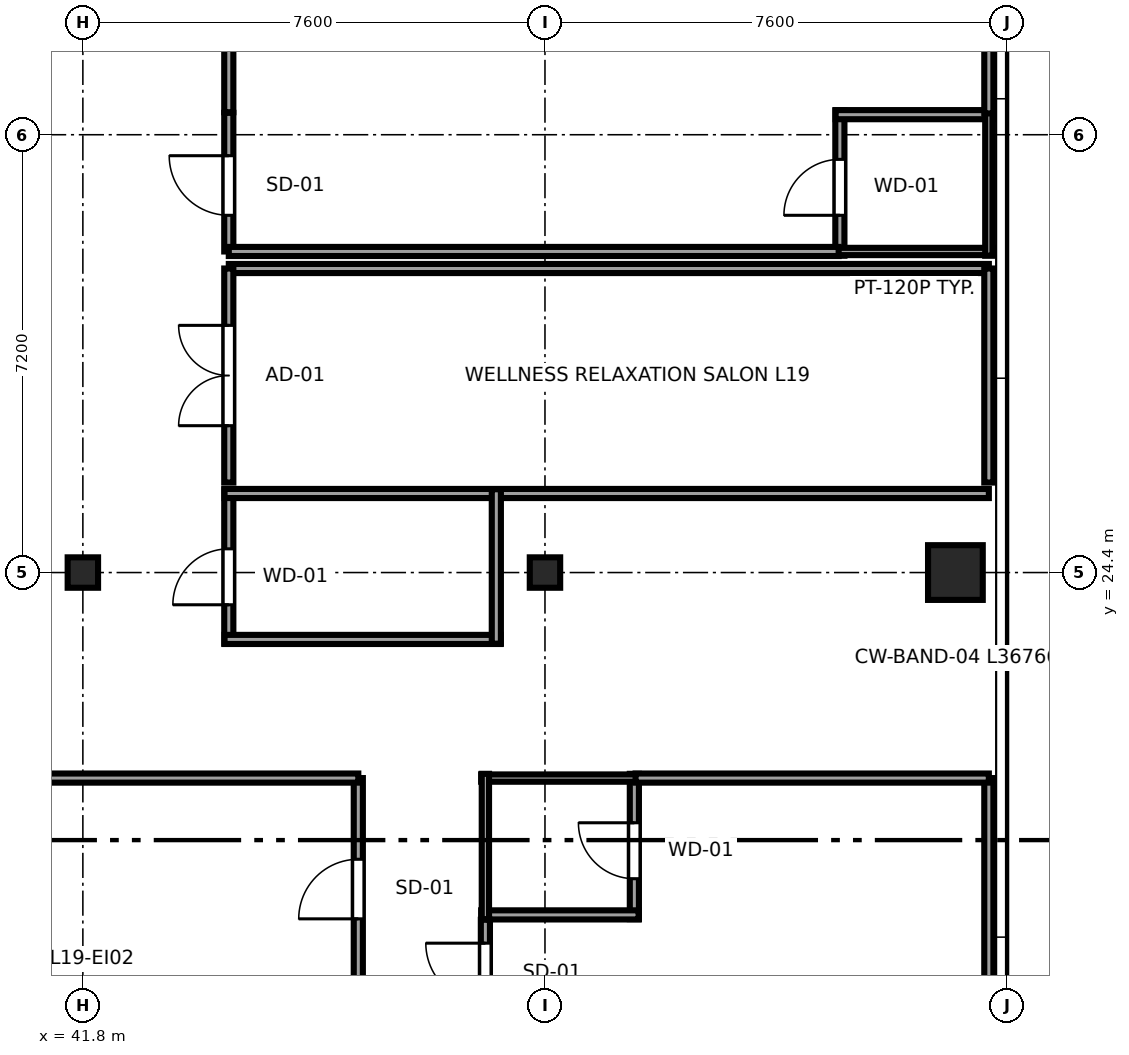
"""IFC4 building model, lengths in metres.
Left out: names, types, materials, properties, quantities, classifications, styles, units other than length and angle.
Written with IfcOpenShell. Run it as: python <this file> out.ifc"""

import sys

from ifc_helpers import new_model, si_unit, direction, frame, frame_2d, origin, origin_2d, place, context, subcontext, project, spatial, rectangle, i_section, extrude, source, transform, mapped, element, fill, save


model = new_model("IFC4")
c1 = context("Model", 3, precision=1e-05, world=origin(), true_north=direction((0.0, 1.0)))
c2 = subcontext(c1, "Body", "Model", "MODEL_VIEW")
j1 = project(units=[si_unit("LENGTHUNIT", "METRE"), si_unit("PLANEANGLEUNIT", "RADIAN")], contexts=[c1])
p1 = place(None, origin())
s1 = spatial("IfcSite", under=j1, at=p1, CompositionType="ELEMENT")
p2 = place(p1, origin())
s2 = spatial("IfcBuilding", under=s1, at=p2, CompositionType="ELEMENT")
p3 = place(p2, frame((0.0, 0.0, 78.15)))
s3 = spatial("IfcBuildingStorey", under=s2, at=p3, CompositionType="ELEMENT", Elevation=78.15)
m1 = source(origin(), c2, "Body", "SweptSolid", [
    extrude(i_section(OverallWidth=0.5, OverallDepth=0.5, WebThickness=0.022, FlangeThickness=0.034, at=origin_2d()), origin(), (0.0, 0.0, 1.0), 3.55),
])
for number, where, z_axis, x_axis in (
    (1, (41.8, 24.4, 0.0), (0.0, 0.0, 1.0), (1.0, 0.0, 0.0)),
    (2, (49.4, 24.4, 0.0), (0.0, 0.0, 1.0), (1.0, 0.0, 0.0)),
):
    element("IfcColumn", number, at=place(p3, frame(where, z_axis=z_axis, x_axis=x_axis)), inside=s3, PredefinedType="COLUMN", context=c2, shape_type="MappedRepresentation", body=[
        mapped(m1, transform((0.0, 0.0, 0.0), x_axis=(1.0, 0.0, 0.0), y_axis=(0.0, 1.0, 0.0), z_axis=(0.0, 0.0, 1.0), scale=1.0)),
    ])
m2 = source(origin(), c2, "Body", "SweptSolid", [
    extrude(rectangle(XDim=0.9, YDim=0.9, at=origin_2d()), origin(), (0.0, 0.0, 1.0), 3.55),
])
p4 = place(p3, frame((56.15, 24.4, 0.0), z_axis=(0.0, 0.0, 1.0), x_axis=(1.0, 0.0, 0.0)))
e3 = element("IfcColumn", 3, at=p4, inside=s3, PredefinedType="COLUMN", context=c2, shape_type="MappedRepresentation", body=[
    mapped(m2, transform((0.0, 0.0, 0.0), x_axis=(1.0, 0.0, 0.0), y_axis=(0.0, 1.0, 0.0), z_axis=(0.0, 0.0, 1.0), scale=1.0)),
])
p5 = place(p3, frame((50.87, 18.7, 0.0), z_axis=(0.0, 0.0, 1.0), x_axis=(0.0, 1.0, 0.0)))
e4 = element("IfcWall", 4, at=p5, inside=s3, PredefinedType="PARTITIONING", context=c2, shape_type="SweptSolid", body=[
    extrude(rectangle(XDim=2.39, YDim=0.15, at=frame_2d((1.195, 0.0))), origin(), (0.0, 0.0, 1.0), 3.37),
])
p6 = place(p5, frame((0.665, 0.0, 0.0)))
e5 = element("IfcOpeningElement", 5, at=p6, cuts=e4, PredefinedType="OPENING", context=c2, shape_type="SweptSolid", body=[
    extrude(rectangle(XDim=0.92, YDim=2.01, at=frame_2d((0.46, 1.005))), frame((0.0, 0.085, 0.0), z_axis=(0.0, -1.0, 0.0), x_axis=(1.0, 0.0, 0.0)), (0.0, 0.0, 1.0), 0.17),
])
p7 = place(p3, frame((48.35, 18.77, 0.0), z_axis=(0.0, 0.0, 1.0), x_axis=(1.0, 0.0, 0.0)))
e6 = element("IfcWall", 6, at=p7, inside=s3, PredefinedType="PARTITIONING", context=c2, shape_type="SweptSolid", body=[
    extrude(rectangle(XDim=2.59, YDim=0.15, at=frame_2d((1.295, 0.0))), origin(), (0.0, 0.0, 1.0), 3.37),
])
p8 = place(p3, frame((48.35, 21.02, 0.0), z_axis=(0.0, 0.0, 1.0), x_axis=(1.0, 0.0, 0.0)))
e7 = element("IfcWall", 7, at=p8, inside=s3, PredefinedType="PLUMBINGWALL", context=c2, shape_type="SweptSolid", body=[
    extrude(rectangle(XDim=2.59, YDim=0.12, at=frame_2d((1.295, 0.0))), origin(), (0.0, 0.0, 1.0), 3.37),
])
p9 = place(p3, frame((48.42, 18.7, 0.0), z_axis=(0.0, 0.0, 1.0), x_axis=(0.0, 1.0, 0.0)))
e8 = element("IfcWall", 8, at=p9, inside=s3, PredefinedType="PLUMBINGWALL", context=c2, shape_type="SweptSolid", body=[
    extrude(rectangle(XDim=2.39, YDim=0.12, at=frame_2d((1.195, 0.0))), origin(), (0.0, 0.0, 1.0), 3.37),
])
p10 = place(p3, frame((54.25, 29.61, 0.0), z_axis=(0.0, 0.0, 1.0), x_axis=(0.0, 1.0, 0.0)))
e9 = element("IfcWall", 9, at=p10, inside=s3, PredefinedType="PARTITIONING", context=c2, shape_type="SweptSolid", body=[
    extrude(rectangle(XDim=2.39, YDim=0.15, at=frame_2d((1.195, 0.0))), origin(), (0.0, 0.0, 1.0), 3.37),
])
p11 = place(p10, frame((0.665, 0.0, 0.0)))
e10 = element("IfcOpeningElement", 10, at=p11, cuts=e9, PredefinedType="OPENING", context=c2, shape_type="SweptSolid", body=[
    extrude(rectangle(XDim=0.92, YDim=2.01, at=frame_2d((0.46, 1.005))), frame((0.0, 0.085, 0.0), z_axis=(0.0, -1.0, 0.0), x_axis=(1.0, 0.0, 0.0)), (0.0, 0.0, 1.0), 0.17),
])
p12 = place(p3, frame((54.18, 29.68, 0.0), z_axis=(0.0, 0.0, 1.0), x_axis=(1.0, 0.0, 0.0)))
e11 = element("IfcWall", 11, at=p12, inside=s3, PredefinedType="PLUMBINGWALL", context=c2, shape_type="SweptSolid", body=[
    extrude(rectangle(XDim=2.59, YDim=0.12, at=frame_2d((1.295, 0.0))), origin(), (0.0, 0.0, 1.0), 3.37),
])
p13 = place(p3, frame((54.18, 31.93, 0.0), z_axis=(0.0, 0.0, 1.0), x_axis=(1.0, 0.0, 0.0)))
e12 = element("IfcWall", 12, at=p13, inside=s3, PredefinedType="PARTITIONING", context=c2, shape_type="SweptSolid", body=[
    extrude(rectangle(XDim=2.59, YDim=0.15, at=frame_2d((1.295, 0.0))), origin(), (0.0, 0.0, 1.0), 3.37),
])
p14 = place(p3, frame((56.7, 29.61, 0.0), z_axis=(0.0, 0.0, 1.0), x_axis=(0.0, 1.0, 0.0)))
e13 = element("IfcWall", 13, at=p14, inside=s3, PredefinedType="PLUMBINGWALL", context=c2, shape_type="SweptSolid", body=[
    extrude(rectangle(XDim=2.39, YDim=0.12, at=frame_2d((1.195, 0.0))), origin(), (0.0, 0.0, 1.0), 3.37),
])
p15 = place(p3, frame((46.33, 17.41, 0.0), z_axis=(0.0, 0.0, 1.0), x_axis=(0.0, 1.0, 0.0)))
e14 = element("IfcWall", 14, at=p15, inside=s3, PredefinedType="PARTITIONING", context=c2, shape_type="SweptSolid", body=[
    extrude(rectangle(XDim=3.61, YDim=0.15, at=frame_2d((1.805, 0.0))), origin(), (0.0, 0.0, 1.0), 3.37),
])
p16 = place(p15, frame((1.295, 0.0, 0.0)))
e15 = element("IfcOpeningElement", 15, at=p16, cuts=e14, PredefinedType="OPENING", context=c2, shape_type="SweptSolid", body=[
    extrude(rectangle(XDim=0.98, YDim=2.12, at=frame_2d((0.49, 1.06))), frame((0.0, 0.085, 0.0), z_axis=(0.0, -1.0, 0.0), x_axis=(1.0, 0.0, 0.0)), (0.0, 0.0, 1.0), 0.17),
])
p17 = place(p3, frame((34.65, 21.02, 0.0), z_axis=(0.0, 0.0, 1.0), x_axis=(1.0, 0.0, 0.0)))
e16 = element("IfcWall", 16, at=p17, inside=s3, PredefinedType="PARTITIONING", context=c2, shape_type="SweptSolid", body=[
    extrude(rectangle(XDim=11.68, YDim=0.15, at=frame_2d((5.84, 0.0))), origin(), (0.0, 0.0, 1.0), 3.37),
])
p18 = place(p3, frame((48.42, 14.28, 0.0), z_axis=(0.0, 0.0, 1.0), x_axis=(0.0, 1.0, 0.0)))
e17 = element("IfcWall", 17, at=p18, inside=s3, PredefinedType="PARTITIONING", context=c2, shape_type="SweptSolid", body=[
    extrude(rectangle(XDim=4.41, YDim=0.15, at=frame_2d((2.205, 0.0))), origin(), (0.0, 0.0, 1.0), 3.37),
])
p19 = place(p18, frame((3.045, 0.0, 0.0)))
e18 = element("IfcOpeningElement", 18, at=p19, cuts=e17, PredefinedType="OPENING", context=c2, shape_type="SweptSolid", body=[
    extrude(rectangle(XDim=0.98, YDim=2.12, at=frame_2d((0.49, 1.06))), frame((0.0, 0.085, 0.0), z_axis=(0.0, -1.0, 0.0), x_axis=(1.0, 0.0, 0.0)), (0.0, 0.0, 1.0), 0.17),
])
p20 = place(p3, frame((56.7, 14.28, 0.0), z_axis=(0.0, 0.0, 1.0), x_axis=(0.0, 1.0, 0.0)))
e19 = element("IfcWall", 19, at=p20, inside=s3, PredefinedType="PARTITIONING", context=c2, shape_type="SweptSolid", body=[
    extrude(rectangle(XDim=6.74, YDim=0.15, at=frame_2d((3.37, 0.0))), origin(), (0.0, 0.0, 1.0), 3.37),
])
p21 = place(p3, frame((50.89, 21.02, 0.0), z_axis=(0.0, 0.0, 1.0), x_axis=(1.0, 0.0, 0.0)))
e20 = element("IfcWall", 20, at=p21, inside=s3, PredefinedType="PARTITIONING", context=c2, shape_type="SweptSolid", body=[
    extrude(rectangle(XDim=5.81, YDim=0.15, at=frame_2d((2.905, 0.0))), origin(), (0.0, 0.0, 1.0), 3.37),
])
p22 = place(p3, frame((44.2, 23.23, 0.0), z_axis=(0.0, 0.0, 1.0), x_axis=(0.0, 1.0, 0.0)))
e21 = element("IfcWall", 21, at=p22, inside=s3, PredefinedType="PARTITIONING", context=c2, shape_type="SweptSolid", body=[
    extrude(rectangle(XDim=2.54, YDim=0.15, at=frame_2d((1.27, 0.0))), origin(), (0.0, 0.0, 1.0), 3.37),
])
p23 = place(p22, frame((0.64, 0.0, 0.0)))
e22 = element("IfcOpeningElement", 22, at=p23, cuts=e21, PredefinedType="OPENING", context=c2, shape_type="SweptSolid", body=[
    extrude(rectangle(XDim=0.92, YDim=2.01, at=frame_2d((0.46, 1.005))), frame((0.0, 0.085, 0.0), z_axis=(0.0, -1.0, 0.0), x_axis=(1.0, 0.0, 0.0)), (0.0, 0.0, 1.0), 0.17),
])
p24 = place(p3, frame((44.13, 23.3, 0.0), z_axis=(0.0, 0.0, 1.0), x_axis=(1.0, 0.0, 0.0)))
e23 = element("IfcWall", 23, at=p24, inside=s3, PredefinedType="PARTITIONING", context=c2, shape_type="SweptSolid", body=[
    extrude(rectangle(XDim=4.54, YDim=0.15, at=frame_2d((2.27, 0.0))), origin(), (0.0, 0.0, 1.0), 3.37),
])
p25 = place(p3, frame((44.13, 25.7, 0.0), z_axis=(0.0, 0.0, 1.0), x_axis=(1.0, 0.0, 0.0)))
e24 = element("IfcWall", 24, at=p25, inside=s3, PredefinedType="PARTITIONING", context=c2, shape_type="SweptSolid", body=[
    extrude(rectangle(XDim=12.57, YDim=0.15, at=frame_2d((6.285, 0.0))), origin(), (0.0, 0.0, 1.0), 3.37),
])
p26 = place(p3, frame((48.6, 23.23, 0.0), z_axis=(0.0, 0.0, 1.0), x_axis=(0.0, 1.0, 0.0)))
e25 = element("IfcWall", 25, at=p26, inside=s3, PredefinedType="PARTITIONING", context=c2, shape_type="SweptSolid", body=[
    extrude(rectangle(XDim=2.54, YDim=0.15, at=frame_2d((1.27, 0.0))), origin(), (0.0, 0.0, 1.0), 3.37),
])
p27 = place(p3, frame((44.2, 29.4, 0.0), z_axis=(0.0, 0.0, 1.0), x_axis=(1.0, 0.0, 0.0)))
e26 = element("IfcWall", 26, at=p27, inside=s3, PredefinedType="PARTITIONING", context=c2, shape_type="SweptSolid", body=[
    extrude(rectangle(XDim=12.5, YDim=0.15, at=frame_2d((6.25, 0.0))), origin(), (0.0, 0.0, 1.0), 3.37),
])
p28 = place(p3, frame((44.2, 25.88, 0.0), z_axis=(0.0, 0.0, 1.0), x_axis=(0.0, 1.0, 0.0)))
e27 = element("IfcWall", 27, at=p28, inside=s3, PredefinedType="PARTITIONING", context=c2, shape_type="SweptSolid", body=[
    extrude(rectangle(XDim=3.52, YDim=0.15, at=frame_2d((1.76, 0.0))), origin(), (0.0, 0.0, 1.0), 3.37),
])
p29 = place(p28, frame((0.935, 0.0, 0.0)))
e28 = element("IfcOpeningElement", 28, at=p29, cuts=e27, PredefinedType="OPENING", context=c2, shape_type="SweptSolid", body=[
    extrude(rectangle(XDim=1.65, YDim=2.15, at=frame_2d((0.825, 1.075))), frame((0.0, 0.085, 0.0), z_axis=(0.0, -1.0, 0.0), x_axis=(1.0, 0.0, 0.0)), (0.0, 0.0, 1.0), 0.17),
])
p30 = place(p3, frame((56.7, 25.88, 0.0), z_axis=(0.0, 0.0, 1.0), x_axis=(0.0, 1.0, 0.0)))
e29 = element("IfcWall", 29, at=p30, inside=s3, PredefinedType="PARTITIONING", context=c2, shape_type="SweptSolid", body=[
    extrude(rectangle(XDim=3.52, YDim=0.15, at=frame_2d((1.76, 0.0))), origin(), (0.0, 0.0, 1.0), 3.37),
])
p31 = place(p3, frame((44.2, 29.68, 0.0), z_axis=(0.0, 0.0, 1.0), x_axis=(0.0, 1.0, 0.0)))
e30 = element("IfcWall", 30, at=p31, inside=s3, PredefinedType="PARTITIONING", context=c2, shape_type="SweptSolid", body=[
    extrude(rectangle(XDim=2.28, YDim=0.15, at=frame_2d((1.14, 0.0))), origin(), (0.0, 0.0, 1.0), 3.37),
])
p32 = place(p31, frame((0.595, 0.0, 0.0)))
e31 = element("IfcOpeningElement", 31, at=p32, cuts=e30, PredefinedType="OPENING", context=c2, shape_type="SweptSolid", body=[
    extrude(rectangle(XDim=0.98, YDim=2.12, at=frame_2d((0.49, 1.06))), frame((0.0, 0.085, 0.0), z_axis=(0.0, -1.0, 0.0), x_axis=(1.0, 0.0, 0.0)), (0.0, 0.0, 1.0), 0.17),
])
p33 = place(p3, frame((44.2, 29.68, 0.0), z_axis=(0.0, 0.0, 1.0), x_axis=(1.0, 0.0, 0.0)))
e32 = element("IfcWall", 32, at=p33, inside=s3, PredefinedType="PARTITIONING", context=c2, shape_type="SweptSolid", body=[
    extrude(rectangle(XDim=10.03, YDim=0.15, at=frame_2d((5.015, 0.0))), origin(), (0.0, 0.0, 1.0), 3.37),
])
p34 = place(p3, frame((56.7, 31.95, 0.0), z_axis=(0.0, 0.0, 1.0), x_axis=(0.0, 1.0, 0.0)))
e33 = element("IfcWall", 33, at=p34, inside=s3, PredefinedType="PARTITIONING", context=c2, shape_type="SweptSolid", body=[
    extrude(rectangle(XDim=9.408, YDim=0.15, at=frame_2d((4.704, 0.0))), origin(), (0.0, 0.0, 1.0), 3.37),
])
p35 = place(p3, frame((44.2, 31.97, 0.0), z_axis=(0.0, 0.0, 1.0), x_axis=(0.0, 1.0, 0.0)))
e34 = element("IfcWall", 34, at=p35, inside=s3, PredefinedType="PARTITIONING", context=c2, shape_type="SweptSolid", body=[
    extrude(rectangle(XDim=13.625, YDim=0.15, at=frame_2d((6.812, 0.0))), origin(), (0.0, 0.0, 1.0), 3.37),
])
m3 = source(origin(), c2, "Body", "SweptSolid", [
    extrude(rectangle(XDim=0.92, YDim=2.01, at=frame_2d((0.46, 1.005))), frame((0.0, 0.025, 0.0), z_axis=(0.0, -1.0, 0.0), x_axis=(1.0, 0.0, 0.0)), (0.0, 0.0, 1.0), 0.05),
])
p36 = place(p6, origin())
e35 = element("IfcDoor", 35, at=p36, inside=s3, OperationType="SINGLE_SWING_RIGHT", PredefinedType="DOOR", context=c2, shape_type="MappedRepresentation", body=[
    mapped(m3, transform((0.0, 0.0, 0.0), x_axis=(1.0, 0.0, 0.0), y_axis=(0.0, 1.0, 0.0), z_axis=(0.0, 0.0, 1.0), scale=1.0)),
])
fill(e5, e35)
p37 = place(p11, origin())
e36 = element("IfcDoor", 36, at=p37, inside=s3, OperationType="SINGLE_SWING_LEFT", PredefinedType="DOOR", context=c2, shape_type="MappedRepresentation", body=[
    mapped(m3, transform((0.0, 0.0, 0.0), x_axis=(1.0, 0.0, 0.0), y_axis=(0.0, 1.0, 0.0), z_axis=(0.0, 0.0, 1.0), scale=1.0)),
])
fill(e10, e36)
m4 = source(origin(), c2, "Body", "SweptSolid", [
    extrude(rectangle(XDim=0.98, YDim=2.12, at=frame_2d((0.49, 1.06))), frame((0.0, 0.025, 0.0), z_axis=(0.0, -1.0, 0.0), x_axis=(1.0, 0.0, 0.0)), (0.0, 0.0, 1.0), 0.05),
])
p38 = place(p16, origin())
e37 = element("IfcDoor", 37, at=p38, inside=s3, OperationType="SINGLE_SWING_LEFT", PredefinedType="DOOR", context=c2, shape_type="MappedRepresentation", body=[
    mapped(m4, transform((0.0, 0.0, 0.0), x_axis=(1.0, 0.0, 0.0), y_axis=(0.0, 1.0, 0.0), z_axis=(0.0, 0.0, 1.0), scale=1.0)),
])
fill(e15, e37)
p39 = place(p19, origin())
e38 = element("IfcDoor", 38, at=p39, inside=s3, OperationType="SINGLE_SWING_RIGHT", PredefinedType="DOOR", context=c2, shape_type="MappedRepresentation", body=[
    mapped(m4, transform((0.0, 0.0, 0.0), x_axis=(1.0, 0.0, 0.0), y_axis=(0.0, 1.0, 0.0), z_axis=(0.0, 0.0, 1.0), scale=1.0)),
])
fill(e18, e38)
p40 = place(p23, origin())
e39 = element("IfcDoor", 39, at=p40, inside=s3, OperationType="SINGLE_SWING_LEFT", PredefinedType="DOOR", context=c2, shape_type="MappedRepresentation", body=[
    mapped(m3, transform((0.0, 0.0, 0.0), x_axis=(1.0, 0.0, 0.0), y_axis=(0.0, 1.0, 0.0), z_axis=(0.0, 0.0, 1.0), scale=1.0)),
])
fill(e22, e39)
m5 = source(origin(), c2, "Body", "SweptSolid", [
    extrude(rectangle(XDim=1.65, YDim=2.15, at=frame_2d((0.825, 1.075))), frame((0.0, 0.025, 0.0), z_axis=(0.0, -1.0, 0.0), x_axis=(1.0, 0.0, 0.0)), (0.0, 0.0, 1.0), 0.05),
])
p41 = place(p29, origin())
e40 = element("IfcDoor", 40, at=p41, inside=s3, OperationType="DOUBLE_DOOR_SINGLE_SWING", PredefinedType="DOOR", context=c2, shape_type="MappedRepresentation", body=[
    mapped(m5, transform((0.0, 0.0, 0.0), x_axis=(1.0, 0.0, 0.0), y_axis=(0.0, 1.0, 0.0), z_axis=(0.0, 0.0, 1.0), scale=1.0)),
])
fill(e28, e40)
p42 = place(p32, origin())
e41 = element("IfcDoor", 41, at=p42, inside=s3, OperationType="SINGLE_SWING_RIGHT", PredefinedType="DOOR", context=c2, shape_type="MappedRepresentation", body=[
    mapped(m4, transform((0.0, 0.0, 0.0), x_axis=(1.0, 0.0, 0.0), y_axis=(0.0, 1.0, 0.0), z_axis=(0.0, 0.0, 1.0), scale=1.0)),
])
fill(e31, e41)
save(model, sys.argv[1])
